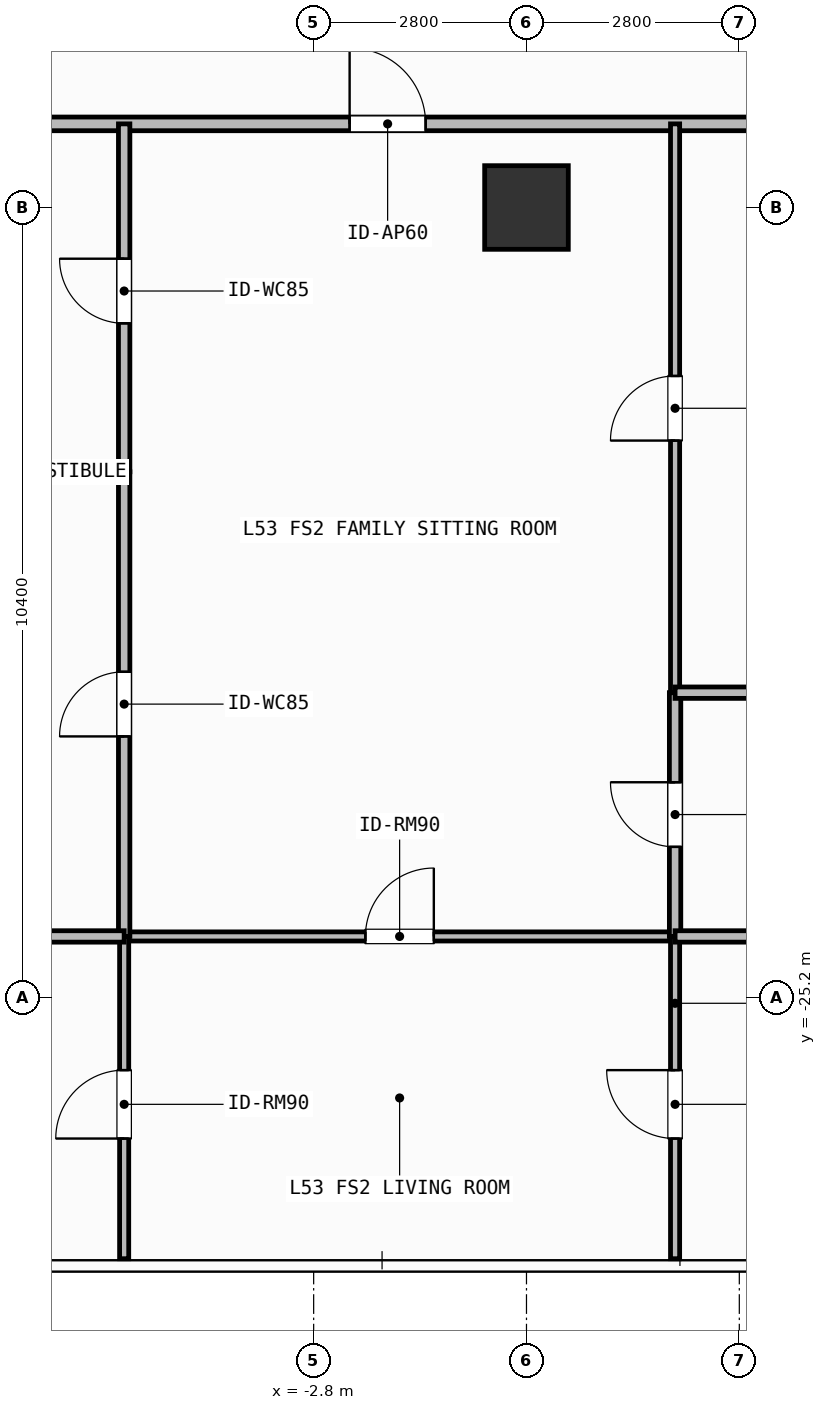
"""IFC4 building model, lengths in metres.
Left out: names, types, materials, properties, quantities, classifications, styles, units other than length and angle.
Written with IfcOpenShell. Run it as: python <this file> out.ifc"""

import sys

from ifc_helpers import new_model, si_unit, direction, frame, frame_2d, origin, origin_2d, place, context, subcontext, project, spatial, rectangle, extrude, element, fill, save


model = new_model("IFC4")
c1 = context("Model", 3, precision=1e-05, world=origin(), true_north=direction((0.0, 1.0)))
c2 = subcontext(c1, "Body", "Model", "MODEL_VIEW")
j1 = project(units=[si_unit("LENGTHUNIT", "METRE"), si_unit("PLANEANGLEUNIT", "RADIAN")], contexts=[c1])
p1 = place(None, origin())
s1 = spatial("IfcSite", under=j1, at=p1, CompositionType="ELEMENT")
p2 = place(p1, origin())
s2 = spatial("IfcBuilding", under=s1, at=p2, CompositionType="ELEMENT")
p3 = place(p2, frame((0.0, 0.0, 215.7)))
s3 = spatial("IfcBuildingStorey", under=s2, at=p3, CompositionType="ELEMENT", Elevation=215.7)
p4 = place(p3, frame((0.0, -14.8, 0.0), z_axis=(0.0, 0.0, 1.0), x_axis=(1.0, 0.0, 0.0)))
e1 = element("IfcColumn", 1, at=p4, inside=s3, PredefinedType="COLUMN", context=c2, shape_type="SweptSolid", body=[
    extrude(rectangle(XDim=1.1, YDim=1.1, at=origin_2d()), origin(), (0.0, 0.0, 1.0), 3.9),
])
p5 = place(p3, frame((-10.855, -13.7, 0.0), z_axis=(0.0, 0.0, 1.0), x_axis=(1.0, 0.0, 0.0)))
e2 = element("IfcWall", 2, at=p5, inside=s3, PredefinedType="PARTITIONING", context=c2, shape_type="SweptSolid", body=[
    extrude(rectangle(XDim=16.454, YDim=0.18, at=frame_2d((8.227, 0.0))), origin(), (0.0, 0.0, 1.0), 3.62),
])
p6 = place(p5, frame((8.528, 0.0, 0.0)))
e3 = element("IfcOpeningElement", 3, at=p6, cuts=e2, PredefinedType="OPENING", context=c2, shape_type="SweptSolid", body=[
    extrude(rectangle(XDim=1.0, YDim=2.2, at=frame_2d((0.5, 1.1))), frame((0.0, 0.1, 0.0), z_axis=(0.0, -1.0, 0.0), x_axis=(1.0, 0.0, 0.0)), (0.0, 0.0, 1.0), 0.2),
])
p7 = place(p3, frame((-5.293, -24.39, 0.0), z_axis=(0.0, 0.0, 1.0), x_axis=(1.0, 0.0, 0.0)))
e4 = element("IfcWall", 4, at=p7, inside=s3, PredefinedType="PARTITIONING", context=c2, shape_type="SweptSolid", body=[
    extrude(rectangle(XDim=7.248, YDim=0.12, at=frame_2d((3.624, 0.0))), origin(), (0.0, 0.0, 1.0), 3.62),
])
p8 = place(p7, frame((3.174, 0.0, 0.0)))
e5 = element("IfcOpeningElement", 5, at=p8, cuts=e4, PredefinedType="OPENING", context=c2, shape_type="SweptSolid", body=[
    extrude(rectangle(XDim=0.9, YDim=2.1, at=frame_2d((0.45, 1.05))), frame((0.0, 0.07, 0.0), z_axis=(0.0, -1.0, 0.0), x_axis=(1.0, 0.0, 0.0)), (0.0, 0.0, 1.0), 0.14),
])
p9 = place(p3, frame((-5.293, -24.39, 0.0), z_axis=(0.0, 0.0, 1.0), x_axis=(0.0, 1.0, 0.0)))
e6 = element("IfcWall", 6, at=p9, inside=s3, PredefinedType="PARTITIONING", context=c2, shape_type="SweptSolid", body=[
    extrude(rectangle(XDim=6.113, YDim=0.15, at=frame_2d((3.056, 0.0))), origin(), (0.0, 0.0, 1.0), 3.62),
])
p10 = place(p9, frame((2.632, 0.0, 0.0)))
e7 = element("IfcOpeningElement", 7, at=p10, cuts=e6, PredefinedType="OPENING", context=c2, shape_type="SweptSolid", body=[
    extrude(rectangle(XDim=0.85, YDim=2.1, at=frame_2d((0.425, 1.05))), frame((0.0, 0.085, 0.0), z_axis=(0.0, -1.0, 0.0), x_axis=(1.0, 0.0, 0.0)), (0.0, 0.0, 1.0), 0.17),
])
p11 = place(p3, frame((-5.293, -18.277, 0.0), z_axis=(0.0, 0.0, 1.0), x_axis=(0.0, 1.0, 0.0)))
e8 = element("IfcWall", 8, at=p11, inside=s3, PredefinedType="PARTITIONING", context=c2, shape_type="SweptSolid", body=[
    extrude(rectangle(XDim=4.577, YDim=0.15, at=frame_2d((2.289, 0.0))), origin(), (0.0, 0.0, 1.0), 3.62),
])
p12 = place(p11, frame((1.953, 0.0, 0.0)))
e9 = element("IfcOpeningElement", 9, at=p12, cuts=e8, PredefinedType="OPENING", context=c2, shape_type="SweptSolid", body=[
    extrude(rectangle(XDim=0.85, YDim=2.1, at=frame_2d((0.425, 1.05))), frame((0.0, 0.085, 0.0), z_axis=(0.0, -1.0, 0.0), x_axis=(1.0, 0.0, 0.0)), (0.0, 0.0, 1.0), 0.17),
])
p13 = place(p3, frame((-5.293, -28.63, 0.0), z_axis=(0.0, 0.0, 1.0), x_axis=(0.0, 1.0, 0.0)))
e10 = element("IfcWall", 10, at=p13, inside=s3, PredefinedType="PARTITIONING", context=c2, shape_type="SweptSolid", body=[
    extrude(rectangle(XDim=4.24, YDim=0.12, at=frame_2d((2.12, 0.0))), origin(), (0.0, 0.0, 1.0), 3.62),
])
p14 = place(p13, frame((1.581, 0.0, 0.0)))
e11 = element("IfcOpeningElement", 11, at=p14, cuts=e10, PredefinedType="OPENING", context=c2, shape_type="SweptSolid", body=[
    extrude(rectangle(XDim=0.9, YDim=2.1, at=frame_2d((0.45, 1.05))), frame((0.0, 0.07, 0.0), z_axis=(0.0, -1.0, 0.0), x_axis=(1.0, 0.0, 0.0)), (0.0, 0.0, 1.0), 0.14),
])
p15 = place(p3, frame((1.955, -24.39, 0.0), z_axis=(0.0, 0.0, 1.0), x_axis=(0.0, 1.0, 0.0)))
e12 = element("IfcWall", 12, at=p15, inside=s3, PredefinedType="PARTITIONING", context=c2, shape_type="SweptSolid", body=[
    extrude(rectangle(XDim=3.207, YDim=0.15, at=frame_2d((1.604, 0.0))), origin(), (0.0, 0.0, 1.0), 3.62),
])
p16 = place(p15, frame((1.178, 0.0, 0.0)))
e13 = element("IfcOpeningElement", 13, at=p16, cuts=e12, PredefinedType="OPENING", context=c2, shape_type="SweptSolid", body=[
    extrude(rectangle(XDim=0.85, YDim=2.1, at=frame_2d((0.425, 1.05))), frame((0.0, 0.085, 0.0), z_axis=(0.0, -1.0, 0.0), x_axis=(1.0, 0.0, 0.0)), (0.0, 0.0, 1.0), 0.17),
])
p17 = place(p3, frame((1.955, -21.183, 0.0), z_axis=(0.0, 0.0, 1.0), x_axis=(0.0, 1.0, 0.0)))
e14 = element("IfcWall", 14, at=p17, inside=s3, PredefinedType="PARTITIONING", context=c2, shape_type="SweptSolid", body=[
    extrude(rectangle(XDim=7.483, YDim=0.12, at=frame_2d((3.742, 0.0))), origin(), (0.0, 0.0, 1.0), 3.62),
])
p18 = place(p17, frame((3.316, 0.0, 0.0)))
e15 = element("IfcOpeningElement", 15, at=p18, cuts=e14, PredefinedType="OPENING", context=c2, shape_type="SweptSolid", body=[
    extrude(rectangle(XDim=0.85, YDim=2.1, at=frame_2d((0.425, 1.05))), frame((0.0, 0.07, 0.0), z_axis=(0.0, -1.0, 0.0), x_axis=(1.0, 0.0, 0.0)), (0.0, 0.0, 1.0), 0.14),
])
p19 = place(p3, frame((1.955, -28.63, 0.0), z_axis=(0.0, 0.0, 1.0), x_axis=(0.0, 1.0, 0.0)))
e16 = element("IfcWall", 16, at=p19, inside=s3, PredefinedType="PARTITIONING", context=c2, shape_type="SweptSolid", body=[
    extrude(rectangle(XDim=4.24, YDim=0.12, at=frame_2d((2.12, 0.0))), origin(), (0.0, 0.0, 1.0), 3.62),
])
p20 = place(p19, frame((1.581, 0.0, 0.0)))
e17 = element("IfcOpeningElement", 17, at=p20, cuts=e16, PredefinedType="OPENING", context=c2, shape_type="SweptSolid", body=[
    extrude(rectangle(XDim=0.9, YDim=2.1, at=frame_2d((0.45, 1.05))), frame((0.0, 0.07, 0.0), z_axis=(0.0, -1.0, 0.0), x_axis=(1.0, 0.0, 0.0)), (0.0, 0.0, 1.0), 0.14),
])
for number, where, z_axis, x_axis in (
    (18, (-10.855, -18.277, 0.0), (0.0, 0.0, 1.0), (1.0, 0.0, 0.0)),
    (19, (-10.855, -24.39, 0.0), (0.0, 0.0, 1.0), (1.0, 0.0, 0.0)),
):
    element("IfcWall", number, at=place(p3, frame(where, z_axis=z_axis, x_axis=x_axis)), inside=s3, PredefinedType="PARTITIONING", context=c2, shape_type="SweptSolid", body=[
        extrude(rectangle(XDim=5.562, YDim=0.15, at=frame_2d((2.781, 0.0))), origin(), (0.0, 0.0, 1.0), 3.62),
    ])
for number, where, z_axis, x_axis in (
    (20, (1.955, -21.183, 0.0), (0.0, 0.0, 1.0), (1.0, 0.0, 0.0)),
    (21, (1.955, -24.39, 0.0), (0.0, 0.0, 1.0), (1.0, 0.0, 0.0)),
):
    element("IfcWall", number, at=place(p3, frame(where, z_axis=z_axis, x_axis=x_axis)), inside=s3, PredefinedType="PARTITIONING", context=c2, shape_type="SweptSolid", body=[
        extrude(rectangle(XDim=3.644, YDim=0.15, at=frame_2d((1.822, 0.0))), origin(), (0.0, 0.0, 1.0), 3.62),
    ])
p21 = place(p6, origin())
e22 = element("IfcDoor", 22, at=p21, inside=s3, OperationType="SINGLE_SWING_LEFT", PredefinedType="DOOR", context=c2, shape_type="SweptSolid", body=[
    extrude(rectangle(XDim=1.0, YDim=2.2, at=frame_2d((0.5, 1.1))), frame((0.0, 0.025, 0.0), z_axis=(0.0, -1.0, 0.0), x_axis=(1.0, 0.0, 0.0)), (0.0, 0.0, 1.0), 0.05),
])
fill(e3, e22)
p22 = place(p8, origin())
e23 = element("IfcDoor", 23, at=p22, inside=s3, OperationType="SINGLE_SWING_RIGHT", PredefinedType="DOOR", context=c2, shape_type="SweptSolid", body=[
    extrude(rectangle(XDim=0.9, YDim=2.1, at=frame_2d((0.45, 1.05))), frame((0.0, 0.025, 0.0), z_axis=(0.0, -1.0, 0.0), x_axis=(1.0, 0.0, 0.0)), (0.0, 0.0, 1.0), 0.05),
])
fill(e5, e23)
p23 = place(p10, origin())
e24 = element("IfcDoor", 24, at=p23, inside=s3, OperationType="SINGLE_SWING_LEFT", PredefinedType="DOOR", context=c2, shape_type="SweptSolid", body=[
    extrude(rectangle(XDim=0.85, YDim=2.1, at=frame_2d((0.425, 1.05))), frame((0.0, 0.025, 0.0), z_axis=(0.0, -1.0, 0.0), x_axis=(1.0, 0.0, 0.0)), (0.0, 0.0, 1.0), 0.05),
])
fill(e7, e24)
p24 = place(p12, origin())
e25 = element("IfcDoor", 25, at=p24, inside=s3, OperationType="SINGLE_SWING_RIGHT", PredefinedType="DOOR", context=c2, shape_type="SweptSolid", body=[
    extrude(rectangle(XDim=0.85, YDim=2.1, at=frame_2d((0.425, 1.05))), frame((0.0, 0.025, 0.0), z_axis=(0.0, -1.0, 0.0), x_axis=(1.0, 0.0, 0.0)), (0.0, 0.0, 1.0), 0.05),
])
fill(e9, e25)
p25 = place(p14, origin())
e26 = element("IfcDoor", 26, at=p25, inside=s3, OperationType="SINGLE_SWING_LEFT", PredefinedType="DOOR", context=c2, shape_type="SweptSolid", body=[
    extrude(rectangle(XDim=0.9, YDim=2.1, at=frame_2d((0.45, 1.05))), frame((0.0, 0.025, 0.0), z_axis=(0.0, -1.0, 0.0), x_axis=(1.0, 0.0, 0.0)), (0.0, 0.0, 1.0), 0.05),
])
fill(e11, e26)
p26 = place(p16, origin())
e27 = element("IfcDoor", 27, at=p26, inside=s3, OperationType="SINGLE_SWING_RIGHT", PredefinedType="DOOR", context=c2, shape_type="SweptSolid", body=[
    extrude(rectangle(XDim=0.85, YDim=2.1, at=frame_2d((0.425, 1.05))), frame((0.0, 0.025, 0.0), z_axis=(0.0, -1.0, 0.0), x_axis=(1.0, 0.0, 0.0)), (0.0, 0.0, 1.0), 0.05),
])
fill(e13, e27)
p27 = place(p18, origin())
e28 = element("IfcDoor", 28, at=p27, inside=s3, OperationType="SINGLE_SWING_LEFT", PredefinedType="DOOR", context=c2, shape_type="SweptSolid", body=[
    extrude(rectangle(XDim=0.85, YDim=2.1, at=frame_2d((0.425, 1.05))), frame((0.0, 0.025, 0.0), z_axis=(0.0, -1.0, 0.0), x_axis=(1.0, 0.0, 0.0)), (0.0, 0.0, 1.0), 0.05),
])
fill(e15, e28)
p28 = place(p20, origin())
e29 = element("IfcDoor", 29, at=p28, inside=s3, OperationType="SINGLE_SWING_RIGHT", PredefinedType="DOOR", context=c2, shape_type="SweptSolid", body=[
    extrude(rectangle(XDim=0.9, YDim=2.1, at=frame_2d((0.45, 1.05))), frame((0.0, 0.025, 0.0), z_axis=(0.0, -1.0, 0.0), x_axis=(1.0, 0.0, 0.0)), (0.0, 0.0, 1.0), 0.05),
])
fill(e17, e29)
save(model, sys.argv[1])
